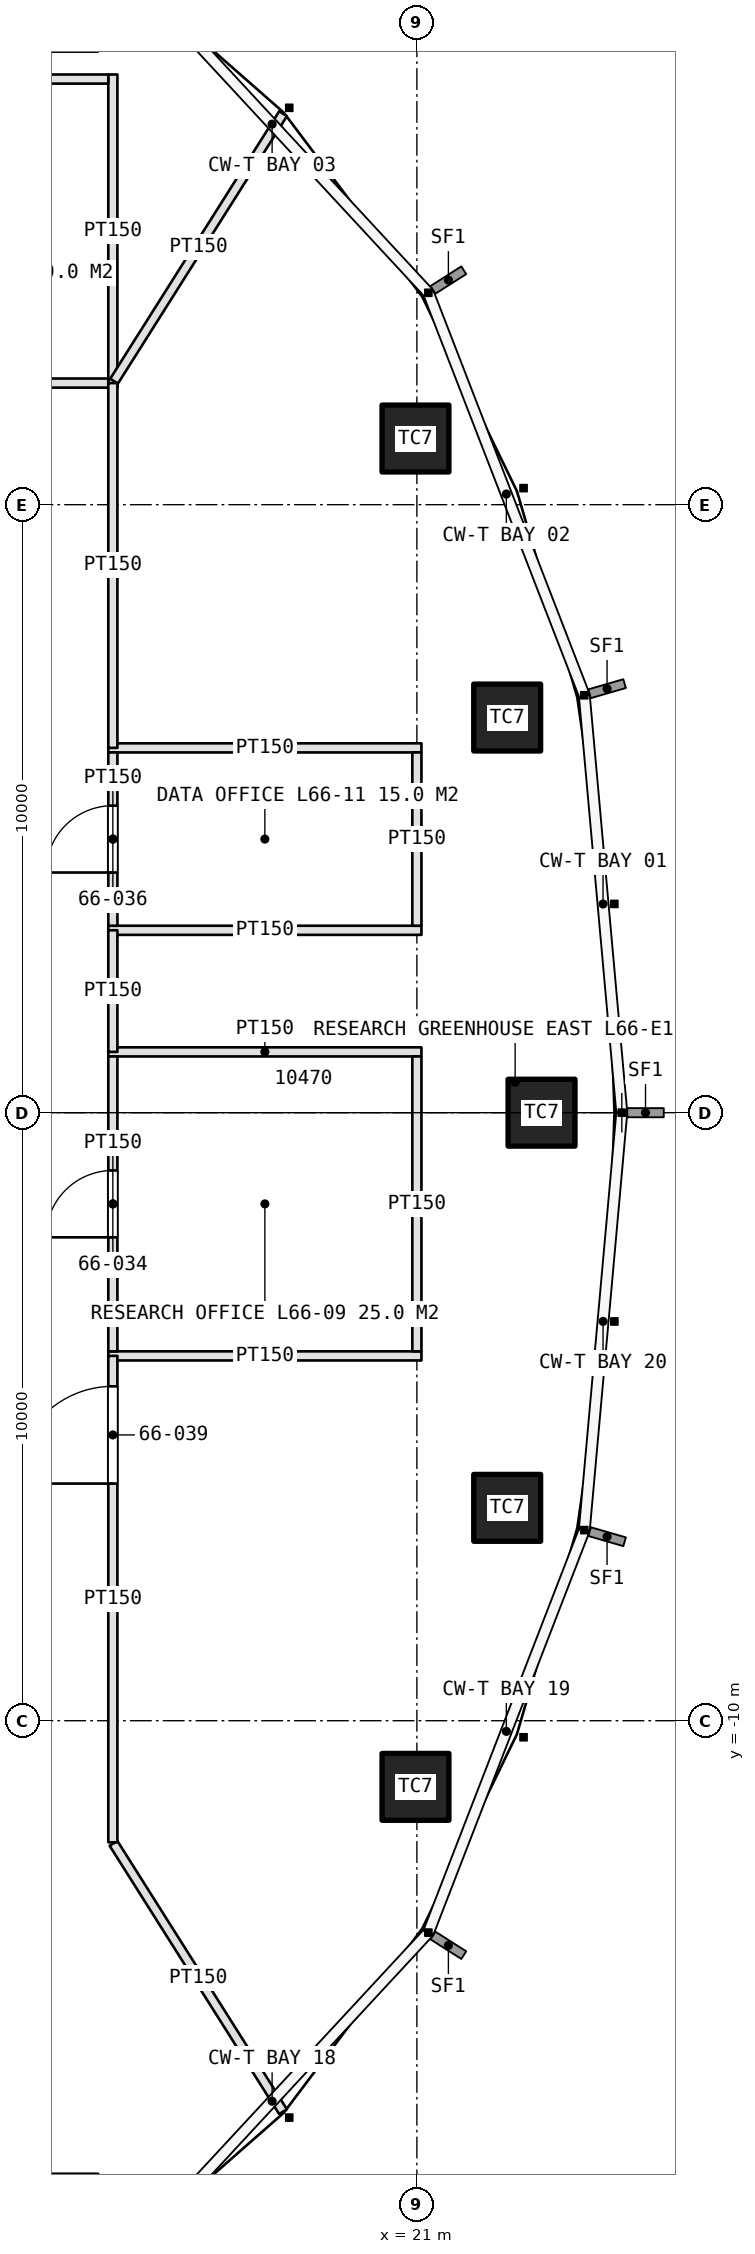
"""IFC4 building model, lengths in metres.
Left out: names, types, materials, properties, quantities, classifications, styles, units other than length and angle.
Written with IfcOpenShell. Run it as: python <this file> out.ifc"""

import sys

from ifc_helpers import new_model, si_unit, direction, frame, frame_2d, origin, origin_2d, place, context, subcontext, project, spatial, rectangle, extrude, element, fill, save


model = new_model("IFC4")
c1 = context("Model", 3, precision=1e-05, world=origin(), true_north=direction((0.0, 1.0)))
c2 = subcontext(c1, "Body", "Model", "MODEL_VIEW")
j1 = project(units=[si_unit("LENGTHUNIT", "METRE"), si_unit("PLANEANGLEUNIT", "RADIAN")], contexts=[c1])
p1 = place(None, origin())
s1 = spatial("IfcSite", under=j1, at=p1, CompositionType="ELEMENT")
p2 = place(p1, origin())
s2 = spatial("IfcBuilding", under=s1, at=p2, CompositionType="ELEMENT")
p3 = place(p2, frame((0.0, 0.0, 296.4)))
s3 = spatial("IfcBuildingStorey", under=s2, at=p3, CompositionType="ELEMENT", Elevation=296.4)
for number, where, z_axis, x_axis in (
    (1, (23.05, 0.0, 0.0), (0.0, 0.0, 1.0), (1.0, 0.0, 0.0)),
    (2, (22.485, 6.499, 0.0), (0.0, 0.0, 1.0), (1.0, 0.0, 0.0)),
    (3, (20.977, 11.088, 0.0), (0.0, 0.0, 1.0), (1.0, 0.0, 0.0)),
    (4, (20.977, -11.088, 0.0), (0.0, 0.0, 1.0), (1.0, 0.0, 0.0)),
    (5, (22.485, -6.499, 0.0), (0.0, 0.0, 1.0), (1.0, 0.0, 0.0)),
):
    element("IfcColumn", number, at=place(p3, frame(where, z_axis=z_axis, x_axis=x_axis)), inside=s3, PredefinedType="COLUMN", context=c2, shape_type="SweptSolid", body=[
        extrude(rectangle(XDim=1.1, YDim=1.1, at=origin_2d()), origin(), (0.0, 0.0, 1.0), 4.2),
    ])
p4 = place(p3, frame((16.0, 11.925, 0.0), z_axis=(0.0, 0.0, 1.0), x_axis=(0.0, 1.0, 0.0)))
e6 = element("IfcWall", 6, at=p4, inside=s3, PredefinedType="PARTITIONING", context=c2, shape_type="SweptSolid", body=[
    extrude(rectangle(XDim=5.15, YDim=0.15, at=frame_2d((2.575, 0.0))), origin(), (0.0, 0.0, 1.0), 3.0),
])
p5 = place(p3, frame((12.1, 12.0, 0.0), z_axis=(0.0, 0.0, 1.0), x_axis=(1.0, 0.0, 0.0)))
e7 = element("IfcWall", 7, at=p5, inside=s3, PredefinedType="PARTITIONING", context=c2, shape_type="SweptSolid", body=[
    extrude(rectangle(XDim=3.825, YDim=0.15, at=frame_2d((1.913, 0.0))), origin(), (0.0, 0.0, 1.0), 3.0),
])
p6 = place(p5, frame((1.363, 0.0, 0.0)))
e8 = element("IfcOpeningElement", 8, at=p6, cuts=e7, PredefinedType="OPENING", context=c2, shape_type="SweptSolid", body=[
    extrude(rectangle(XDim=1.1, YDim=2.3, at=frame_2d((0.55, 1.15))), frame((0.0, 0.085, 0.0), z_axis=(0.0, -1.0, 0.0), x_axis=(1.0, 0.0, 0.0)), (0.0, 0.0, 1.0), 0.17),
])
p7 = place(p3, frame((12.1, 17.0, 0.0), z_axis=(0.0, 0.0, 1.0), x_axis=(1.0, 0.0, 0.0)))
e9 = element("IfcWall", 9, at=p7, inside=s3, PredefinedType="PARTITIONING", context=c2, shape_type="SweptSolid", body=[
    extrude(rectangle(XDim=3.825, YDim=0.15, at=frame_2d((1.913, 0.0))), origin(), (0.0, 0.0, 1.0), 3.0),
])
for number, where, z_axis, x_axis in (
    (10, (15.925, -4.0, 0.0), (0.0, 0.0, 1.0), (1.0, 0.0, 0.0)),
    (11, (15.925, 1.0, 0.0), (0.0, 0.0, 1.0), (1.0, 0.0, 0.0)),
):
    element("IfcWall", number, at=place(p3, frame(where, z_axis=z_axis, x_axis=x_axis)), inside=s3, PredefinedType="PARTITIONING", context=c2, shape_type="SweptSolid", body=[
        extrude(rectangle(XDim=5.15, YDim=0.15, at=frame_2d((2.575, 0.0))), origin(), (0.0, 0.0, 1.0), 3.0),
    ])
p8 = place(p3, frame((16.0, -3.925, 0.0), z_axis=(0.0, 0.0, 1.0), x_axis=(0.0, 1.0, 0.0)))
e12 = element("IfcWall", 12, at=p8, inside=s3, PredefinedType="PARTITIONING", context=c2, shape_type="SweptSolid", body=[
    extrude(rectangle(XDim=4.85, YDim=0.15, at=frame_2d((2.425, 0.0))), origin(), (0.0, 0.0, 1.0), 3.0),
])
p9 = place(p8, frame((1.875, 0.0, 0.0)))
e13 = element("IfcOpeningElement", 13, at=p9, cuts=e12, PredefinedType="OPENING", context=c2, shape_type="SweptSolid", body=[
    extrude(rectangle(XDim=1.1, YDim=2.3, at=frame_2d((0.55, 1.15))), frame((0.0, 0.085, 0.0), z_axis=(0.0, -1.0, 0.0), x_axis=(1.0, 0.0, 0.0)), (0.0, 0.0, 1.0), 0.17),
])
p10 = place(p3, frame((21.0, -3.925, 0.0), z_axis=(0.0, 0.0, 1.0), x_axis=(0.0, 1.0, 0.0)))
e14 = element("IfcWall", 14, at=p10, inside=s3, PredefinedType="PARTITIONING", context=c2, shape_type="SweptSolid", body=[
    extrude(rectangle(XDim=4.85, YDim=0.15, at=frame_2d((2.425, 0.0))), origin(), (0.0, 0.0, 1.0), 3.0),
])
for number, where, z_axis, x_axis in (
    (15, (15.925, 3.0, 0.0), (0.0, 0.0, 1.0), (1.0, 0.0, 0.0)),
    (16, (15.925, 6.0, 0.0), (0.0, 0.0, 1.0), (1.0, 0.0, 0.0)),
):
    element("IfcWall", number, at=place(p3, frame(where, z_axis=z_axis, x_axis=x_axis)), inside=s3, PredefinedType="PARTITIONING", context=c2, shape_type="SweptSolid", body=[
        extrude(rectangle(XDim=5.15, YDim=0.15, at=frame_2d((2.575, 0.0))), origin(), (0.0, 0.0, 1.0), 3.0),
    ])
p11 = place(p3, frame((16.0, 3.075, 0.0), z_axis=(0.0, 0.0, 1.0), x_axis=(0.0, 1.0, 0.0)))
e17 = element("IfcWall", 17, at=p11, inside=s3, PredefinedType="PARTITIONING", context=c2, shape_type="SweptSolid", body=[
    extrude(rectangle(XDim=2.85, YDim=0.15, at=frame_2d((1.425, 0.0))), origin(), (0.0, 0.0, 1.0), 3.0),
])
p12 = place(p11, frame((0.875, 0.0, 0.0)))
e18 = element("IfcOpeningElement", 18, at=p12, cuts=e17, PredefinedType="OPENING", context=c2, shape_type="SweptSolid", body=[
    extrude(rectangle(XDim=1.1, YDim=2.3, at=frame_2d((0.55, 1.15))), frame((0.0, 0.085, 0.0), z_axis=(0.0, -1.0, 0.0), x_axis=(1.0, 0.0, 0.0)), (0.0, 0.0, 1.0), 0.17),
])
p13 = place(p3, frame((21.0, 3.075, 0.0), z_axis=(0.0, 0.0, 1.0), x_axis=(0.0, 1.0, 0.0)))
e19 = element("IfcWall", 19, at=p13, inside=s3, PredefinedType="PARTITIONING", context=c2, shape_type="SweptSolid", body=[
    extrude(rectangle(XDim=2.85, YDim=0.15, at=frame_2d((1.425, 0.0))), origin(), (0.0, 0.0, 1.0), 3.0),
])
p14 = place(p3, frame((16.011, -12.017, 0.0), z_axis=(0.0, 0.0, 1.0), x_axis=(0.53415837449, -0.845384427916, 0.0)))
e20 = element("IfcWall", 20, at=p14, inside=s3, PredefinedType="PARTITIONING", context=c2, shape_type="SweptSolid", body=[
    extrude(rectangle(XDim=5.22, YDim=0.15, at=frame_2d((2.61, 0.0))), origin(), (0.0, 0.0, 1.0), 3.0),
])
p15 = place(p3, frame((16.02, 12.032, 0.0), z_axis=(0.0, 0.0, 1.0), x_axis=(0.534176584227, 0.845372921771, 0.0)))
e21 = element("IfcWall", 21, at=p15, inside=s3, PredefinedType="PARTITIONING", context=c2, shape_type="SweptSolid", body=[
    extrude(rectangle(XDim=5.203, YDim=0.15, at=frame_2d((2.602, 0.0))), origin(), (0.0, 0.0, 1.0), 3.0),
])
p16 = place(p3, frame((16.0, -12.0, 0.0), z_axis=(0.0, 0.0, 1.0), x_axis=(0.0, 1.0, 0.0)))
e22 = element("IfcWall", 22, at=p16, inside=s3, PredefinedType="PARTITIONING", context=c2, shape_type="SweptSolid", body=[
    extrude(rectangle(XDim=8.0, YDim=0.15, at=frame_2d((4.0, 0.0))), origin(), (0.0, 0.0, 1.0), 3.0),
])
p17 = place(p16, frame((5.9, 0.0, 0.0)))
e23 = element("IfcOpeningElement", 23, at=p17, cuts=e22, PredefinedType="OPENING", context=c2, shape_type="SweptSolid", body=[
    extrude(rectangle(XDim=1.6, YDim=2.4, at=frame_2d((0.8, 1.2))), frame((0.0, 0.085, 0.0), z_axis=(0.0, -1.0, 0.0), x_axis=(1.0, 0.0, 0.0)), (0.0, 0.0, 1.0), 0.17),
])
p18 = place(p3, frame((16.0, 1.0, 0.0), z_axis=(0.0, 0.0, 1.0), x_axis=(0.0, 1.0, 0.0)))
e24 = element("IfcWall", 24, at=p18, inside=s3, PredefinedType="PARTITIONING", context=c2, shape_type="SweptSolid", body=[
    extrude(rectangle(XDim=2.0, YDim=0.15, at=frame_2d((1.0, 0.0))), origin(), (0.0, 0.0, 1.0), 3.0),
])
p19 = place(p3, frame((16.0, 6.0, 0.0), z_axis=(0.0, 0.0, 1.0), x_axis=(0.0, 1.0, 0.0)))
e25 = element("IfcWall", 25, at=p19, inside=s3, PredefinedType="PARTITIONING", context=c2, shape_type="SweptSolid", body=[
    extrude(rectangle(XDim=6.0, YDim=0.15, at=frame_2d((3.0, 0.0))), origin(), (0.0, 0.0, 1.0), 3.0),
])
p20 = place(p9, origin())
e26 = element("IfcDoor", 26, at=p20, inside=s3, OperationType="SINGLE_SWING_LEFT", PredefinedType="DOOR", context=c2, shape_type="SweptSolid", body=[
    extrude(rectangle(XDim=1.1, YDim=2.3, at=frame_2d((0.55, 1.15))), frame((0.0, 0.025, 0.0), z_axis=(0.0, -1.0, 0.0), x_axis=(1.0, 0.0, 0.0)), (0.0, 0.0, 1.0), 0.05),
])
fill(e13, e26)
p21 = place(p12, origin())
e27 = element("IfcDoor", 27, at=p21, inside=s3, OperationType="SINGLE_SWING_LEFT", PredefinedType="DOOR", context=c2, shape_type="SweptSolid", body=[
    extrude(rectangle(XDim=1.1, YDim=2.3, at=frame_2d((0.55, 1.15))), frame((0.0, 0.025, 0.0), z_axis=(0.0, -1.0, 0.0), x_axis=(1.0, 0.0, 0.0)), (0.0, 0.0, 1.0), 0.05),
])
fill(e18, e27)
p22 = place(p17, origin())
e28 = element("IfcDoor", 28, at=p22, inside=s3, OperationType="DOUBLE_DOOR_SINGLE_SWING", PredefinedType="DOOR", context=c2, shape_type="SweptSolid", body=[
    extrude(rectangle(XDim=1.6, YDim=2.4, at=frame_2d((0.8, 1.2))), frame((0.0, 0.025, 0.0), z_axis=(0.0, -1.0, 0.0), x_axis=(1.0, 0.0, 0.0)), (0.0, 0.0, 1.0), 0.05),
])
fill(e23, e28)
save(model, sys.argv[1])
